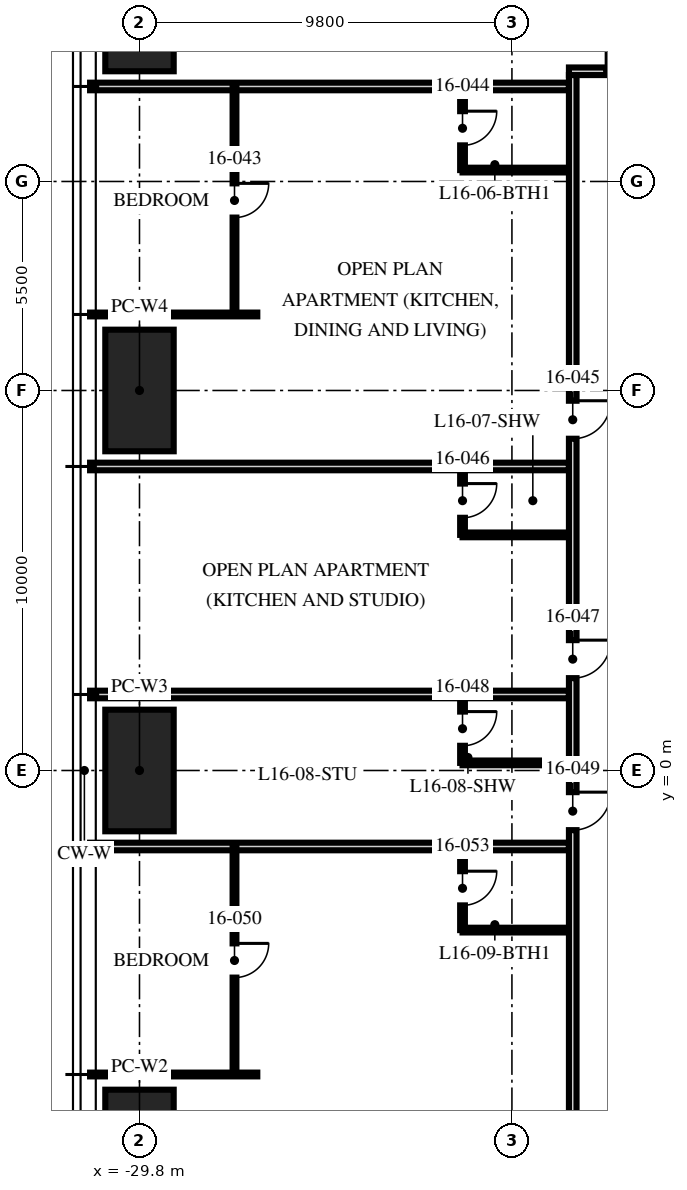
"""IFC4 building model, lengths in metres.
Left out: names, types, materials, properties, quantities, classifications, styles, units other than length and angle.
Written with IfcOpenShell. Run it as: python <this file> out.ifc"""

import sys

from ifc_helpers import new_model, si_unit, direction, frame, frame_2d, origin, origin_2d, place, context, subcontext, project, spatial, rectangle, hollow_rectangle, extrude, element, fill, save


model = new_model("IFC4")
c1 = context("Model", 3, precision=1e-05, world=origin(), true_north=direction((0.0, 1.0)))
c2 = subcontext(c1, "Body", "Model", "MODEL_VIEW")
j1 = project(units=[si_unit("LENGTHUNIT", "METRE"), si_unit("PLANEANGLEUNIT", "RADIAN")], contexts=[c1])
p1 = place(None, origin())
s1 = spatial("IfcSite", under=j1, at=p1, CompositionType="ELEMENT")
p2 = place(p1, origin())
s2 = spatial("IfcBuilding", under=s1, at=p2, CompositionType="ELEMENT")
p3 = place(p2, frame((0.0, 0.0, 66.0)))
s3 = spatial("IfcBuildingStorey", under=s2, at=p3, CompositionType="ELEMENT", Elevation=66.0)
for number, where, z_axis, x_axis in (
    (1, (-29.8, -10.0, 0.0), (0.0, 0.0, 1.0), (0.0, 1.0, 0.0)),
    (2, (-29.8, 0.0, 0.0), (0.0, 0.0, 1.0), (0.0, 1.0, 0.0)),
    (3, (-29.8, 10.0, 0.0), (0.0, 0.0, 1.0), (0.0, 1.0, 0.0)),
    (4, (-29.8, 20.0, 0.0), (0.0, 0.0, 1.0), (0.0, 1.0, 0.0)),
):
    element("IfcColumn", number, at=place(p3, frame(where, z_axis=z_axis, x_axis=x_axis)), inside=s3, PredefinedType="COLUMN", context=c2, shape_type="SweptSolid", body=[
        extrude(hollow_rectangle(XDim=3.2, YDim=1.8, WallThickness=0.2, at=origin_2d()), origin(), (0.0, 0.0, 1.0), 3.75),
    ])
p4 = place(p3, frame((-18.5, 18.0, 0.0), z_axis=(0.0, 0.0, 1.0), x_axis=(-1.0, 0.0, 0.0)))
e5 = element("IfcWall", 5, at=p4, inside=s3, PredefinedType="PARTITIONING", context=c2, shape_type="SweptSolid", body=[
    extrude(rectangle(XDim=12.6, YDim=0.2, at=frame_2d((6.3, 0.0))), origin(), (0.0, 0.0, 1.0), 2.3),
])
p5 = place(p3, frame((-26.7, 12.0, 0.0), z_axis=(0.0, 0.0, 1.0), x_axis=(-1.0, 0.0, 0.0)))
e6 = element("IfcWall", 6, at=p5, inside=s3, PredefinedType="PARTITIONING", context=c2, shape_type="SweptSolid", body=[
    extrude(rectangle(XDim=4.4, YDim=0.1, at=frame_2d((2.2, 0.0))), origin(), (0.0, 0.0, 1.0), 2.71),
])
for number, where, z_axis, x_axis in (
    (7, (-18.5, 8.0, 0.0), (0.0, 0.0, 1.0), (-1.0, 0.0, 0.0)),
    (8, (-18.5, 2.0, 0.0), (0.0, 0.0, 1.0), (-1.0, 0.0, 0.0)),
    (9, (-18.5, -2.0, 0.0), (0.0, 0.0, 1.0), (-1.0, 0.0, 0.0)),
):
    element("IfcWall", number, at=place(p3, frame(where, z_axis=z_axis, x_axis=x_axis)), inside=s3, PredefinedType="PARTITIONING", context=c2, shape_type="SweptSolid", body=[
        extrude(rectangle(XDim=12.6, YDim=0.2, at=frame_2d((6.3, 0.0))), origin(), (0.0, 0.0, 1.0), 2.71),
    ])
p6 = place(p3, frame((-26.7, -8.0, 0.0), z_axis=(0.0, 0.0, 1.0), x_axis=(-1.0, 0.0, 0.0)))
e10 = element("IfcWall", 10, at=p6, inside=s3, PredefinedType="PARTITIONING", context=c2, shape_type="SweptSolid", body=[
    extrude(rectangle(XDim=4.4, YDim=0.1, at=frame_2d((2.2, 0.0))), origin(), (0.0, 0.0, 1.0), 2.71),
])
p7 = place(p3, frame((-27.3, 18.0, 0.0), z_axis=(0.0, 0.0, 1.0), x_axis=(0.0, -1.0, 0.0)))
e11 = element("IfcWall", 11, at=p7, inside=s3, PredefinedType="PARTITIONING", context=c2, shape_type="SweptSolid", body=[
    extrude(rectangle(XDim=6.0, YDim=0.1, at=frame_2d((3.0, 0.0))), origin(), (0.0, 0.0, 1.0), 2.61),
])
p8 = place(p7, frame((2.55, 0.0, 0.0)))
e12 = element("IfcOpeningElement", 12, at=p8, cuts=e11, PredefinedType="OPENING", context=c2, shape_type="SweptSolid", body=[
    extrude(rectangle(XDim=0.9, YDim=2.1, at=frame_2d((0.45, 1.05))), frame((0.0, 0.06, 0.0), z_axis=(0.0, -1.0, 0.0), x_axis=(1.0, 0.0, 0.0)), (0.0, 0.0, 1.0), 0.12),
])
p9 = place(p3, frame((-21.3, 18.0, 0.0), z_axis=(0.0, 0.0, 1.0), x_axis=(0.0, -1.0, 0.0)))
e13 = element("IfcWall", 13, at=p9, inside=s3, PredefinedType="PARTITIONING", context=c2, shape_type="SweptSolid", body=[
    extrude(rectangle(XDim=2.2, YDim=0.125, at=frame_2d((1.1, 0.0))), origin(), (0.0, 0.0, 1.0), 3.5),
])
p10 = place(p9, frame((0.65, 0.0, 0.0)))
e14 = element("IfcOpeningElement", 14, at=p10, cuts=e13, PredefinedType="OPENING", context=c2, shape_type="SweptSolid", body=[
    extrude(rectangle(XDim=0.9, YDim=2.1, at=frame_2d((0.45, 1.05))), frame((0.0, 0.073, 0.0), z_axis=(0.0, -1.0, 0.0), x_axis=(1.0, 0.0, 0.0)), (0.0, 0.0, 1.0), 0.145),
])
p11 = place(p3, frame((-18.5, 15.8, 0.0), z_axis=(0.0, 0.0, 1.0), x_axis=(-1.0, 0.0, 0.0)))
e15 = element("IfcWall", 15, at=p11, inside=s3, PredefinedType="PARTITIONING", context=c2, shape_type="SweptSolid", body=[
    extrude(rectangle(XDim=2.8, YDim=0.125, at=frame_2d((1.4, 0.0))), origin(), (0.0, 0.0, 1.0), 3.5),
])
p12 = place(p3, frame((-21.3, 8.0, 0.0), z_axis=(0.0, 0.0, 1.0), x_axis=(0.0, -1.0, 0.0)))
e16 = element("IfcWall", 16, at=p12, inside=s3, PredefinedType="PARTITIONING", context=c2, shape_type="SweptSolid", body=[
    extrude(rectangle(XDim=1.8, YDim=0.125, at=frame_2d((0.9, 0.0))), origin(), (0.0, 0.0, 1.0), 3.5),
])
p13 = place(p12, frame((0.45, 0.0, 0.0)))
e17 = element("IfcOpeningElement", 17, at=p13, cuts=e16, PredefinedType="OPENING", context=c2, shape_type="SweptSolid", body=[
    extrude(rectangle(XDim=0.9, YDim=2.1, at=frame_2d((0.45, 1.05))), frame((0.0, 0.073, 0.0), z_axis=(0.0, -1.0, 0.0), x_axis=(1.0, 0.0, 0.0)), (0.0, 0.0, 1.0), 0.145),
])
p14 = place(p3, frame((-18.5, 6.2, 0.0), z_axis=(0.0, 0.0, 1.0), x_axis=(-1.0, 0.0, 0.0)))
e18 = element("IfcWall", 18, at=p14, inside=s3, PredefinedType="PARTITIONING", context=c2, shape_type="SweptSolid", body=[
    extrude(rectangle(XDim=2.8, YDim=0.125, at=frame_2d((1.4, 0.0))), origin(), (0.0, 0.0, 1.0), 3.5),
])
p15 = place(p3, frame((-21.3, 2.0, 0.0), z_axis=(0.0, 0.0, 1.0), x_axis=(0.0, -1.0, 0.0)))
e19 = element("IfcWall", 19, at=p15, inside=s3, PredefinedType="PARTITIONING", context=c2, shape_type="SweptSolid", body=[
    extrude(rectangle(XDim=1.8, YDim=0.125, at=frame_2d((0.9, 0.0))), origin(), (0.0, 0.0, 1.0), 3.5),
])
p16 = place(p15, frame((0.45, 0.0, 0.0)))
e20 = element("IfcOpeningElement", 20, at=p16, cuts=e19, PredefinedType="OPENING", context=c2, shape_type="SweptSolid", body=[
    extrude(rectangle(XDim=0.9, YDim=2.1, at=frame_2d((0.45, 1.05))), frame((0.0, 0.073, 0.0), z_axis=(0.0, -1.0, 0.0), x_axis=(1.0, 0.0, 0.0)), (0.0, 0.0, 1.0), 0.145),
])
p17 = place(p3, frame((-18.5, 0.2, 0.0), z_axis=(0.0, 0.0, 1.0), x_axis=(-1.0, 0.0, 0.0)))
e21 = element("IfcWall", 21, at=p17, inside=s3, PredefinedType="PARTITIONING", context=c2, shape_type="SweptSolid", body=[
    extrude(rectangle(XDim=2.8, YDim=0.125, at=frame_2d((1.4, 0.0))), origin(), (0.0, 0.0, 1.0), 2.492),
])
p18 = place(p3, frame((-27.3, -2.0, 0.0), z_axis=(0.0, 0.0, 1.0), x_axis=(0.0, -1.0, 0.0)))
e22 = element("IfcWall", 22, at=p18, inside=s3, PredefinedType="PARTITIONING", context=c2, shape_type="SweptSolid", body=[
    extrude(rectangle(XDim=6.0, YDim=0.1, at=frame_2d((3.0, 0.0))), origin(), (0.0, 0.0, 1.0), 2.61),
])
p19 = place(p18, frame((2.55, 0.0, 0.0)))
e23 = element("IfcOpeningElement", 23, at=p19, cuts=e22, PredefinedType="OPENING", context=c2, shape_type="SweptSolid", body=[
    extrude(rectangle(XDim=0.9, YDim=2.1, at=frame_2d((0.45, 1.05))), frame((0.0, 0.06, 0.0), z_axis=(0.0, -1.0, 0.0), x_axis=(1.0, 0.0, 0.0)), (0.0, 0.0, 1.0), 0.12),
])
p20 = place(p3, frame((-21.3, -2.0, 0.0), z_axis=(0.0, 0.0, 1.0), x_axis=(0.0, -1.0, 0.0)))
e24 = element("IfcWall", 24, at=p20, inside=s3, PredefinedType="PARTITIONING", context=c2, shape_type="SweptSolid", body=[
    extrude(rectangle(XDim=2.2, YDim=0.125, at=frame_2d((1.1, 0.0))), origin(), (0.0, 0.0, 1.0), 3.5),
])
p21 = place(p20, frame((0.65, 0.0, 0.0)))
e25 = element("IfcOpeningElement", 25, at=p21, cuts=e24, PredefinedType="OPENING", context=c2, shape_type="SweptSolid", body=[
    extrude(rectangle(XDim=0.9, YDim=2.1, at=frame_2d((0.45, 1.05))), frame((0.0, 0.073, 0.0), z_axis=(0.0, -1.0, 0.0), x_axis=(1.0, 0.0, 0.0)), (0.0, 0.0, 1.0), 0.145),
])
p22 = place(p3, frame((-18.5, -4.2, 0.0), z_axis=(0.0, 0.0, 1.0), x_axis=(-1.0, 0.0, 0.0)))
e26 = element("IfcWall", 26, at=p22, inside=s3, PredefinedType="PARTITIONING", context=c2, shape_type="SweptSolid", body=[
    extrude(rectangle(XDim=2.8, YDim=0.125, at=frame_2d((1.4, 0.0))), origin(), (0.0, 0.0, 1.0), 3.5),
])
p23 = place(p3, frame((-18.5, 18.4, 0.0), z_axis=(0.0, 0.0, 1.0), x_axis=(1.0, 0.0, 0.0)))
e27 = element("IfcWall", 27, at=p23, inside=s3, PredefinedType="PARTITIONING", context=c2, shape_type="SweptSolid", body=[
    extrude(rectangle(XDim=24.5, YDim=0.2, at=frame_2d((12.25, 0.0))), origin(), (0.0, 0.0, 1.0), 2.3),
])
p24 = place(p23, frame((10.93, 0.0, 0.0)))
e28 = element("IfcOpeningElement", 28, at=p24, cuts=e27, PredefinedType="OPENING", context=c2, shape_type="SweptSolid", body=[
    extrude(rectangle(XDim=1.0, YDim=2.2, at=frame_2d((0.5, 1.1))), frame((0.0, 0.11, 0.0), z_axis=(0.0, -1.0, 0.0), x_axis=(1.0, 0.0, 0.0)), (0.0, 0.0, 1.0), 0.22),
])
p25 = place(p23, frame((0.98, 0.0, 0.0)))
e29 = element("IfcOpeningElement", 29, at=p25, cuts=e27, PredefinedType="OPENING", context=c2, shape_type="SweptSolid", body=[
    extrude(rectangle(XDim=1.0, YDim=2.2, at=frame_2d((0.5, 1.1))), frame((0.0, 0.11, 0.0), z_axis=(0.0, -1.0, 0.0), x_axis=(1.0, 0.0, 0.0)), (0.0, 0.0, 1.0), 0.22),
])
p26 = place(p3, frame((-18.4, 18.3, 0.0), z_axis=(0.0, 0.0, 1.0), x_axis=(0.0, -1.0, 0.0)))
e30 = element("IfcWall", 30, at=p26, inside=s3, PredefinedType="PARTITIONING", context=c2, shape_type="SweptSolid", body=[
    extrude(rectangle(XDim=36.6, YDim=0.2, at=frame_2d((18.3, 0.0))), origin(), (0.0, 0.0, 1.0), 2.3),
])
p27 = place(p26, frame((8.57, 0.0, 0.0)))
e31 = element("IfcOpeningElement", 31, at=p27, cuts=e30, PredefinedType="OPENING", context=c2, shape_type="SweptSolid", body=[
    extrude(rectangle(XDim=1.0, YDim=2.2, at=frame_2d((0.5, 1.1))), frame((0.0, 0.11, 0.0), z_axis=(0.0, -1.0, 0.0), x_axis=(1.0, 0.0, 0.0)), (0.0, 0.0, 1.0), 0.22),
])
p28 = place(p26, frame((14.87, 0.0, 0.0)))
e32 = element("IfcOpeningElement", 32, at=p28, cuts=e30, PredefinedType="OPENING", context=c2, shape_type="SweptSolid", body=[
    extrude(rectangle(XDim=1.0, YDim=2.2, at=frame_2d((0.5, 1.1))), frame((0.0, 0.11, 0.0), z_axis=(0.0, -1.0, 0.0), x_axis=(1.0, 0.0, 0.0)), (0.0, 0.0, 1.0), 0.22),
])
p29 = place(p26, frame((18.87, 0.0, 0.0)))
e33 = element("IfcOpeningElement", 33, at=p29, cuts=e30, PredefinedType="OPENING", context=c2, shape_type="SweptSolid", body=[
    extrude(rectangle(XDim=1.0, YDim=2.2, at=frame_2d((0.5, 1.1))), frame((0.0, 0.11, 0.0), z_axis=(0.0, -1.0, 0.0), x_axis=(1.0, 0.0, 0.0)), (0.0, 0.0, 1.0), 0.22),
])
p30 = place(p25, origin())
e34 = element("IfcDoor", 34, at=p30, inside=s3, OperationType="SINGLE_SWING_LEFT", PredefinedType="DOOR", context=c2, shape_type="SweptSolid", body=[
    extrude(rectangle(XDim=1.0, YDim=2.2, at=frame_2d((0.5, 1.1))), frame((0.0, 0.025, 0.0), z_axis=(0.0, -1.0, 0.0), x_axis=(1.0, 0.0, 0.0)), (0.0, 0.0, 1.0), 0.05),
])
fill(e29, e34)
p31 = place(p8, origin())
e35 = element("IfcDoor", 35, at=p31, inside=s3, OperationType="SINGLE_SWING_LEFT", PredefinedType="DOOR", context=c2, shape_type="SweptSolid", body=[
    extrude(rectangle(XDim=0.9, YDim=2.1, at=frame_2d((0.45, 1.05))), frame((0.0, 0.025, 0.0), z_axis=(0.0, -1.0, 0.0), x_axis=(1.0, 0.0, 0.0)), (0.0, 0.0, 1.0), 0.05),
])
fill(e12, e35)
p32 = place(p10, origin())
e36 = element("IfcDoor", 36, at=p32, inside=s3, OperationType="SINGLE_SWING_LEFT", PredefinedType="DOOR", context=c2, shape_type="SweptSolid", body=[
    extrude(rectangle(XDim=0.9, YDim=2.1, at=frame_2d((0.45, 1.05))), frame((0.0, 0.025, 0.0), z_axis=(0.0, -1.0, 0.0), x_axis=(1.0, 0.0, 0.0)), (0.0, 0.0, 1.0), 0.05),
])
fill(e14, e36)
p33 = place(p27, origin())
e37 = element("IfcDoor", 37, at=p33, inside=s3, OperationType="SINGLE_SWING_LEFT", PredefinedType="DOOR", context=c2, shape_type="SweptSolid", body=[
    extrude(rectangle(XDim=1.0, YDim=2.2, at=frame_2d((0.5, 1.1))), frame((0.0, 0.025, 0.0), z_axis=(0.0, -1.0, 0.0), x_axis=(1.0, 0.0, 0.0)), (0.0, 0.0, 1.0), 0.05),
])
fill(e31, e37)
p34 = place(p13, origin())
e38 = element("IfcDoor", 38, at=p34, inside=s3, OperationType="SINGLE_SWING_LEFT", PredefinedType="DOOR", context=c2, shape_type="SweptSolid", body=[
    extrude(rectangle(XDim=0.9, YDim=2.1, at=frame_2d((0.45, 1.05))), frame((0.0, 0.025, 0.0), z_axis=(0.0, -1.0, 0.0), x_axis=(1.0, 0.0, 0.0)), (0.0, 0.0, 1.0), 0.05),
])
fill(e17, e38)
p35 = place(p28, origin())
e39 = element("IfcDoor", 39, at=p35, inside=s3, OperationType="SINGLE_SWING_LEFT", PredefinedType="DOOR", context=c2, shape_type="SweptSolid", body=[
    extrude(rectangle(XDim=1.0, YDim=2.2, at=frame_2d((0.5, 1.1))), frame((0.0, 0.025, 0.0), z_axis=(0.0, -1.0, 0.0), x_axis=(1.0, 0.0, 0.0)), (0.0, 0.0, 1.0), 0.05),
])
fill(e32, e39)
p36 = place(p16, origin())
e40 = element("IfcDoor", 40, at=p36, inside=s3, OperationType="SINGLE_SWING_LEFT", PredefinedType="DOOR", context=c2, shape_type="SweptSolid", body=[
    extrude(rectangle(XDim=0.9, YDim=2.1, at=frame_2d((0.45, 1.05))), frame((0.0, 0.025, 0.0), z_axis=(0.0, -1.0, 0.0), x_axis=(1.0, 0.0, 0.0)), (0.0, 0.0, 1.0), 0.05),
])
fill(e20, e40)
p37 = place(p29, origin())
e41 = element("IfcDoor", 41, at=p37, inside=s3, OperationType="SINGLE_SWING_LEFT", PredefinedType="DOOR", context=c2, shape_type="SweptSolid", body=[
    extrude(rectangle(XDim=1.0, YDim=2.2, at=frame_2d((0.5, 1.1))), frame((0.0, 0.025, 0.0), z_axis=(0.0, -1.0, 0.0), x_axis=(1.0, 0.0, 0.0)), (0.0, 0.0, 1.0), 0.05),
])
fill(e33, e41)
p38 = place(p19, origin())
e42 = element("IfcDoor", 42, at=p38, inside=s3, OperationType="SINGLE_SWING_LEFT", PredefinedType="DOOR", context=c2, shape_type="SweptSolid", body=[
    extrude(rectangle(XDim=0.9, YDim=2.1, at=frame_2d((0.45, 1.05))), frame((0.0, 0.025, 0.0), z_axis=(0.0, -1.0, 0.0), x_axis=(1.0, 0.0, 0.0)), (0.0, 0.0, 1.0), 0.05),
])
fill(e23, e42)
p39 = place(p21, origin())
e43 = element("IfcDoor", 43, at=p39, inside=s3, OperationType="SINGLE_SWING_LEFT", PredefinedType="DOOR", context=c2, shape_type="SweptSolid", body=[
    extrude(rectangle(XDim=0.9, YDim=2.1, at=frame_2d((0.45, 1.05))), frame((0.0, 0.025, 0.0), z_axis=(0.0, -1.0, 0.0), x_axis=(1.0, 0.0, 0.0)), (0.0, 0.0, 1.0), 0.05),
])
fill(e25, e43)
save(model, sys.argv[1])
